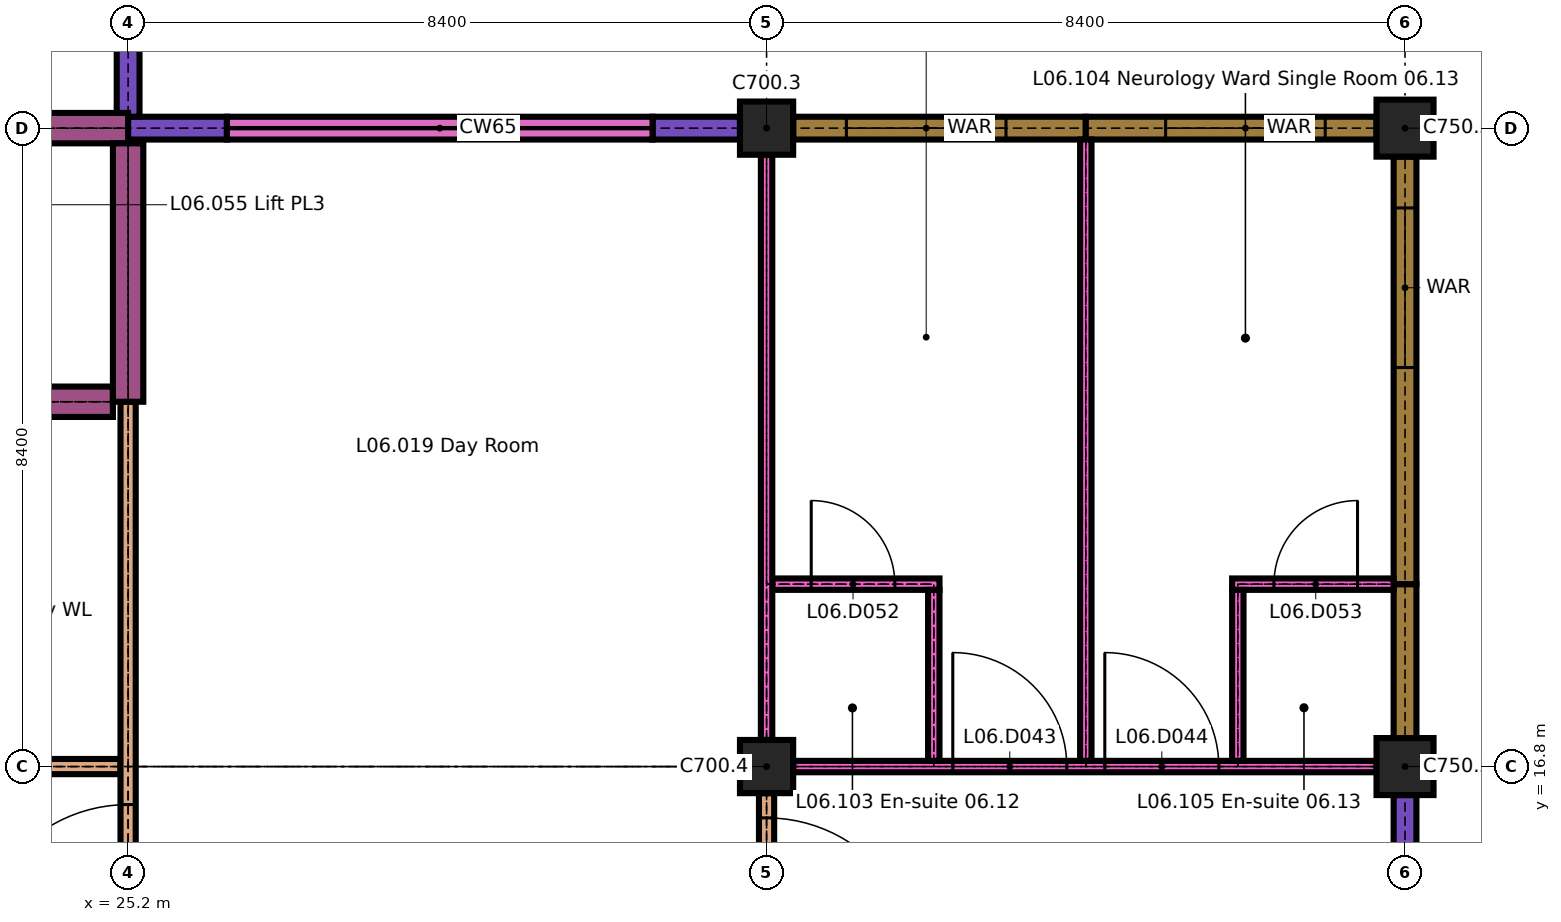
"""IFC4 building model, lengths in metres.
Left out: names, types, materials, properties, quantities, classifications, styles, units other than length and angle.
Written with IfcOpenShell. Run it as: python <this file> out.ifc"""

import sys

from ifc_helpers import new_model, si_unit, direction, frame, frame_2d, origin, origin_2d, place, context, subcontext, project, spatial, rectangle, extrude, element, fill, save


model = new_model("IFC4")
c1 = context("Model", 3, precision=1e-05, world=origin(), true_north=direction((0.0, 1.0)))
c2 = subcontext(c1, "Body", "Model", "MODEL_VIEW")
j1 = project(units=[si_unit("LENGTHUNIT", "METRE"), si_unit("PLANEANGLEUNIT", "RADIAN")], contexts=[c1])
p1 = place(None, origin())
s1 = spatial("IfcSite", under=j1, at=p1, CompositionType="ELEMENT")
p2 = place(p1, origin())
s2 = spatial("IfcBuilding", under=s1, at=p2, CompositionType="ELEMENT")
p3 = place(p2, frame((0.0, 0.0, 26.1)))
s3 = spatial("IfcBuildingStorey", under=s2, at=p3, CompositionType="ELEMENT", Elevation=26.1)
p4 = place(p3, frame((33.6, 16.8, 0.0), z_axis=(0.0, 0.0, 1.0), x_axis=(1.0, 0.0, 0.0)))
e1 = element("IfcColumn", 1, at=p4, inside=s3, PredefinedType="COLUMN", context=c2, shape_type="SweptSolid", body=[
    extrude(rectangle(XDim=0.7, YDim=0.7, at=origin_2d()), origin(), (0.0, 0.0, 1.0), 3.3),
])
p5 = place(p3, frame((42.0, 16.8, 0.0), z_axis=(0.0, 0.0, 1.0), x_axis=(1.0, 0.0, 0.0)))
e2 = element("IfcColumn", 2, at=p5, inside=s3, PredefinedType="COLUMN", context=c2, shape_type="SweptSolid", body=[
    extrude(rectangle(XDim=0.75, YDim=0.75, at=origin_2d()), origin(), (0.0, 0.0, 1.0), 3.2),
])
p6 = place(p3, frame((33.6, 25.2, 0.0), z_axis=(0.0, 0.0, 1.0), x_axis=(1.0, 0.0, 0.0)))
e3 = element("IfcColumn", 3, at=p6, inside=s3, PredefinedType="COLUMN", context=c2, shape_type="SweptSolid", body=[
    extrude(rectangle(XDim=0.7, YDim=0.7, at=origin_2d()), origin(), (0.0, 0.0, 1.0), 3.2),
])
p7 = place(p3, frame((42.0, 25.2, 0.0), z_axis=(0.0, 0.0, 1.0), x_axis=(1.0, 0.0, 0.0)))
e4 = element("IfcColumn", 4, at=p7, inside=s3, PredefinedType="COLUMN", context=c2, shape_type="SweptSolid", body=[
    extrude(rectangle(XDim=0.75, YDim=0.75, at=origin_2d()), origin(), (0.0, 0.0, 1.0), 3.2),
])
p8 = place(p3, frame((25.05, 25.2, 0.0), z_axis=(0.0, 0.0, 1.0), x_axis=(1.0, 0.0, 0.0)))
e5 = element("IfcWall", 5, at=p8, inside=s3, PredefinedType="SOLIDWALL", context=c2, shape_type="SweptSolid", body=[
    extrude(rectangle(XDim=1.45, YDim=0.3, at=frame_2d((0.725, 0.0))), origin(), (0.0, 0.0, 1.0), 3.3),
])
p9 = place(p3, frame((32.1, 25.2, 0.0), z_axis=(0.0, 0.0, 1.0), x_axis=(1.0, 0.0, 0.0)))
e6 = element("IfcWall", 6, at=p9, inside=s3, PredefinedType="SOLIDWALL", context=c2, shape_type="SweptSolid", body=[
    extrude(rectangle(XDim=1.15, YDim=0.3, at=frame_2d((0.575, 0.0))), origin(), (0.0, 0.0, 1.0), 3.3),
])
p10 = place(p3, frame((26.5, 25.2, 0.0), z_axis=(0.0, 0.0, 1.0), x_axis=(1.0, 0.0, 0.0)))
e7 = element("IfcWall", 7, at=p10, inside=s3, PredefinedType="SOLIDWALL", context=c2, shape_type="SweptSolid", body=[
    extrude(rectangle(XDim=5.6, YDim=0.3, at=frame_2d((2.8, 0.0))), origin(), (0.0, 0.0, 1.0), 0.6),
])
p11 = place(p3, frame((33.95, 25.2, 0.0), z_axis=(0.0, 0.0, 1.0), x_axis=(1.0, 0.0, 0.0)))
e8 = element("IfcWall", 8, at=p11, inside=s3, PredefinedType="SOLIDWALL", context=c2, shape_type="SweptSolid", body=[
    extrude(rectangle(XDim=3.85, YDim=0.3, at=frame_2d((1.925, 0.0))), origin(), (0.0, 0.0, 1.0), 2.9),
])
p12 = place(p11, frame((0.7, 0.0, 0.9)))
e9 = element("IfcOpeningElement", 9, at=p12, cuts=e8, PredefinedType="OPENING", context=c2, shape_type="SweptSolid", body=[
    extrude(rectangle(XDim=2.1, YDim=1.5, at=frame_2d((1.05, 0.75))), frame((0.0, 0.16, 0.0), z_axis=(0.0, -1.0, 0.0), x_axis=(1.0, 0.0, 0.0)), (0.0, 0.0, 1.0), 0.32),
])
p13 = place(p3, frame((37.8, 25.2, 0.0), z_axis=(0.0, 0.0, 1.0), x_axis=(1.0, 0.0, 0.0)))
e10 = element("IfcWall", 10, at=p13, inside=s3, PredefinedType="SOLIDWALL", context=c2, shape_type="SweptSolid", body=[
    extrude(rectangle(XDim=3.825, YDim=0.3, at=frame_2d((1.913, 0.0))), origin(), (0.0, 0.0, 1.0), 2.9),
])
p14 = place(p13, frame((1.05, 0.0, 0.9)))
e11 = element("IfcOpeningElement", 11, at=p14, cuts=e10, PredefinedType="OPENING", context=c2, shape_type="SweptSolid", body=[
    extrude(rectangle(XDim=2.1, YDim=1.5, at=frame_2d((1.05, 0.75))), frame((0.0, 0.16, 0.0), z_axis=(0.0, -1.0, 0.0), x_axis=(1.0, 0.0, 0.0)), (0.0, 0.0, 1.0), 0.32),
])
p15 = place(p3, frame((25.2, 25.35, 0.0), z_axis=(0.0, 0.0, 1.0), x_axis=(0.0, 1.0, 0.0)))
e12 = element("IfcWall", 12, at=p15, inside=s3, PredefinedType="SOLIDWALL", context=c2, shape_type="SweptSolid", body=[
    extrude(rectangle(XDim=1.15, YDim=0.3, at=frame_2d((0.575, 0.0))), origin(), (0.0, 0.0, 1.0), 3.3),
])
p16 = place(p3, frame((42.0, 13.8, 0.0), z_axis=(0.0, 0.0, 1.0), x_axis=(0.0, 1.0, 0.0)))
e13 = element("IfcWall", 13, at=p16, inside=s3, PredefinedType="SOLIDWALL", context=c2, shape_type="SweptSolid", body=[
    extrude(rectangle(XDim=2.625, YDim=0.3, at=frame_2d((1.312, 0.0))), origin(), (0.0, 0.0, 1.0), 3.3),
])
p17 = place(p16, frame((0.45, 0.0, 0.9)))
e14 = element("IfcOpeningElement", 14, at=p17, cuts=e13, PredefinedType="OPENING", context=c2, shape_type="SweptSolid", body=[
    extrude(rectangle(XDim=0.9, YDim=1.5, at=frame_2d((0.45, 0.75))), frame((0.0, 0.16, 0.0), z_axis=(0.0, -1.0, 0.0), x_axis=(1.0, 0.0, 0.0)), (0.0, 0.0, 1.0), 0.32),
])
p18 = place(p3, frame((42.0, 17.175, 0.0), z_axis=(0.0, 0.0, 1.0), x_axis=(0.0, 1.0, 0.0)))
e15 = element("IfcWall", 15, at=p18, inside=s3, PredefinedType="SOLIDWALL", context=c2, shape_type="SweptSolid", body=[
    extrude(rectangle(XDim=2.025, YDim=0.3, at=frame_2d((1.012, 0.0))), origin(), (0.0, 0.0, 1.0), 2.9),
])
p19 = place(p3, frame((42.0, 19.2, 0.0), z_axis=(0.0, 0.0, 1.0), x_axis=(0.0, 1.0, 0.0)))
e16 = element("IfcWall", 16, at=p19, inside=s3, PredefinedType="SOLIDWALL", context=c2, shape_type="SweptSolid", body=[
    extrude(rectangle(XDim=5.625, YDim=0.3, at=frame_2d((2.812, 0.0))), origin(), (0.0, 0.0, 1.0), 2.9),
])
p20 = place(p19, frame((2.85, 0.0, 0.9)))
e17 = element("IfcOpeningElement", 17, at=p20, cuts=e16, PredefinedType="OPENING", context=c2, shape_type="SweptSolid", body=[
    extrude(rectangle(XDim=2.1, YDim=1.5, at=frame_2d((1.05, 0.75))), frame((0.0, 0.16, 0.0), z_axis=(0.0, -1.0, 0.0), x_axis=(1.0, 0.0, 0.0)), (0.0, 0.0, 1.0), 0.32),
])
p21 = place(p3, frame((16.7, 16.8, 0.0), z_axis=(0.0, 0.0, 1.0), x_axis=(1.0, 0.0, 0.0)))
e18 = element("IfcWall", 18, at=p21, inside=s3, PredefinedType="PARTITIONING", context=c2, shape_type="SweptSolid", body=[
    extrude(rectangle(XDim=8.4, YDim=0.2, at=frame_2d((4.2, 0.0))), origin(), (0.0, 0.0, 1.0), 3.3),
])
p22 = place(p21, frame((3.25, 0.0, 0.0)))
e19 = element("IfcOpeningElement", 19, at=p22, cuts=e18, PredefinedType="OPENING", context=c2, shape_type="SweptSolid", body=[
    extrude(rectangle(XDim=2.0, YDim=2.4, at=frame_2d((1.0, 1.2))), frame((0.0, 0.11, 0.0), z_axis=(0.0, -1.0, 0.0), x_axis=(1.0, 0.0, 0.0)), (0.0, 0.0, 1.0), 0.22),
])
p23 = place(p3, frame((33.95, 16.8, 0.0), z_axis=(0.0, 0.0, 1.0), x_axis=(1.0, 0.0, 0.0)))
e20 = element("IfcWall", 20, at=p23, inside=s3, PredefinedType="PARTITIONING", context=c2, shape_type="SweptSolid", body=[
    extrude(rectangle(XDim=7.675, YDim=0.15, at=frame_2d((3.837, 0.0))), origin(), (0.0, 0.0, 1.0), 3.3),
])
p24 = place(p23, frame((2.1, 0.0, 0.0)))
e21 = element("IfcOpeningElement", 21, at=p24, cuts=e20, PredefinedType="OPENING", context=c2, shape_type="SweptSolid", body=[
    extrude(rectangle(XDim=1.5, YDim=2.4, at=frame_2d((0.75, 1.2))), frame((0.0, 0.085, 0.0), z_axis=(0.0, -1.0, 0.0), x_axis=(1.0, 0.0, 0.0)), (0.0, 0.0, 1.0), 0.17),
])
p25 = place(p23, frame((4.1, 0.0, 0.0)))
e22 = element("IfcOpeningElement", 22, at=p25, cuts=e20, PredefinedType="OPENING", context=c2, shape_type="SweptSolid", body=[
    extrude(rectangle(XDim=1.5, YDim=2.4, at=frame_2d((0.75, 1.2))), frame((0.0, 0.085, 0.0), z_axis=(0.0, -1.0, 0.0), x_axis=(1.0, 0.0, 0.0)), (0.0, 0.0, 1.0), 0.17),
])
p26 = place(p3, frame((33.675, 19.2, 0.0), z_axis=(0.0, 0.0, 1.0), x_axis=(1.0, 0.0, 0.0)))
e23 = element("IfcWall", 23, at=p26, inside=s3, PredefinedType="PARTITIONING", context=c2, shape_type="SweptSolid", body=[
    extrude(rectangle(XDim=2.2, YDim=0.15, at=frame_2d((1.1, 0.0))), origin(), (0.0, 0.0, 1.0), 3.3),
])
p27 = place(p26, frame((0.512, 0.0, 0.0)))
e24 = element("IfcOpeningElement", 24, at=p27, cuts=e23, PredefinedType="OPENING", context=c2, shape_type="SweptSolid", body=[
    extrude(rectangle(XDim=1.1, YDim=2.1, at=frame_2d((0.55, 1.05))), frame((0.0, 0.085, 0.0), z_axis=(0.0, -1.0, 0.0), x_axis=(1.0, 0.0, 0.0)), (0.0, 0.0, 1.0), 0.17),
])
p28 = place(p3, frame((39.725, 19.2, 0.0), z_axis=(0.0, 0.0, 1.0), x_axis=(1.0, 0.0, 0.0)))
e25 = element("IfcWall", 25, at=p28, inside=s3, PredefinedType="PARTITIONING", context=c2, shape_type="SweptSolid", body=[
    extrude(rectangle(XDim=2.125, YDim=0.15, at=frame_2d((1.062, 0.0))), origin(), (0.0, 0.0, 1.0), 3.3),
])
p29 = place(p28, frame((0.55, 0.0, 0.0)))
e26 = element("IfcOpeningElement", 26, at=p29, cuts=e25, PredefinedType="OPENING", context=c2, shape_type="SweptSolid", body=[
    extrude(rectangle(XDim=1.1, YDim=2.1, at=frame_2d((0.55, 1.05))), frame((0.0, 0.085, 0.0), z_axis=(0.0, -1.0, 0.0), x_axis=(1.0, 0.0, 0.0)), (0.0, 0.0, 1.0), 0.17),
])
p30 = place(p3, frame((17.0, 21.6, 0.0), z_axis=(0.0, 0.0, 1.0), x_axis=(1.0, 0.0, 0.0)))
e27 = element("IfcWall", 27, at=p30, inside=s3, PredefinedType="SHEAR", context=c2, shape_type="SweptSolid", body=[
    extrude(rectangle(XDim=8.0, YDim=0.4, at=frame_2d((4.0, 0.0))), origin(), (0.0, 0.0, 1.0), 3.3),
])
p31 = place(p30, frame((1.35, 0.0, 0.0)))
e28 = element("IfcOpeningElement", 28, at=p31, cuts=e27, PredefinedType="OPENING", context=c2, shape_type="SweptSolid", body=[
    extrude(rectangle(XDim=1.3, YDim=2.1, at=frame_2d((0.65, 1.05))), frame((0.0, 0.21, 0.0), z_axis=(0.0, -1.0, 0.0), x_axis=(1.0, 0.0, 0.0)), (0.0, 0.0, 1.0), 0.42),
])
p32 = place(p30, frame((5.45, 0.0, 0.0)))
e29 = element("IfcOpeningElement", 29, at=p32, cuts=e27, PredefinedType="OPENING", context=c2, shape_type="SweptSolid", body=[
    extrude(rectangle(XDim=1.1, YDim=2.1, at=frame_2d((0.55, 1.05))), frame((0.0, 0.21, 0.0), z_axis=(0.0, -1.0, 0.0), x_axis=(1.0, 0.0, 0.0)), (0.0, 0.0, 1.0), 0.42),
])
p33 = place(p3, frame((16.8, 25.2, 0.0), z_axis=(0.0, 0.0, 1.0), x_axis=(1.0, 0.0, 0.0)))
e30 = element("IfcWall", 30, at=p33, inside=s3, PredefinedType="SHEAR", context=c2, shape_type="SweptSolid", body=[
    extrude(rectangle(XDim=8.4, YDim=0.4, at=frame_2d((4.2, 0.0))), origin(), (0.0, 0.0, 1.0), 3.3),
])
p34 = place(p3, frame((25.2, 8.75, 0.0), z_axis=(0.0, 0.0, 1.0), x_axis=(0.0, 1.0, 0.0)))
e31 = element("IfcWall", 31, at=p34, inside=s3, PredefinedType="PARTITIONING", context=c2, shape_type="SweptSolid", body=[
    extrude(rectangle(XDim=12.85, YDim=0.2, at=frame_2d((6.425, 0.0))), origin(), (0.0, 0.0, 1.0), 3.3),
])
p35 = place(p34, frame((0.325, 0.0, 0.0)))
e32 = element("IfcOpeningElement", 32, at=p35, cuts=e31, PredefinedType="OPENING", context=c2, shape_type="SweptSolid", body=[
    extrude(rectangle(XDim=2.0, YDim=2.4, at=frame_2d((1.0, 1.2))), frame((0.0, 0.11, 0.0), z_axis=(0.0, -1.0, 0.0), x_axis=(1.0, 0.0, 0.0)), (0.0, 0.0, 1.0), 0.22),
])
p36 = place(p34, frame((5.55, 0.0, 0.0)))
e33 = element("IfcOpeningElement", 33, at=p36, cuts=e31, PredefinedType="OPENING", context=c2, shape_type="SweptSolid", body=[
    extrude(rectangle(XDim=2.0, YDim=2.4, at=frame_2d((1.0, 1.2))), frame((0.0, 0.11, 0.0), z_axis=(0.0, -1.0, 0.0), x_axis=(1.0, 0.0, 0.0)), (0.0, 0.0, 1.0), 0.22),
])
p37 = place(p3, frame((25.2, 21.6, 0.0), z_axis=(0.0, 0.0, 1.0), x_axis=(0.0, 1.0, 0.0)))
e34 = element("IfcWall", 34, at=p37, inside=s3, PredefinedType="SHEAR", context=c2, shape_type="SweptSolid", body=[
    extrude(rectangle(XDim=3.4, YDim=0.4, at=frame_2d((1.7, 0.0))), origin(), (0.0, 0.0, 1.0), 3.3),
])
p38 = place(p3, frame((33.6, 3.6, 0.0), z_axis=(0.0, 0.0, 1.0), x_axis=(0.0, 1.0, 0.0)))
e35 = element("IfcWall", 35, at=p38, inside=s3, PredefinedType="PARTITIONING", context=c2, shape_type="SweptSolid", body=[
    extrude(rectangle(XDim=12.85, YDim=0.2, at=frame_2d((6.425, 0.0))), origin(), (0.0, 0.0, 1.0), 3.3),
])
p39 = place(p38, frame((5.3, 0.0, 0.0)))
e36 = element("IfcOpeningElement", 36, at=p39, cuts=e35, PredefinedType="OPENING", context=c2, shape_type="SweptSolid", body=[
    extrude(rectangle(XDim=2.0, YDim=2.4, at=frame_2d((1.0, 1.2))), frame((0.0, 0.11, 0.0), z_axis=(0.0, -1.0, 0.0), x_axis=(1.0, 0.0, 0.0)), (0.0, 0.0, 1.0), 0.22),
])
p40 = place(p38, frame((10.525, 0.0, 0.0)))
e37 = element("IfcOpeningElement", 37, at=p40, cuts=e35, PredefinedType="OPENING", context=c2, shape_type="SweptSolid", body=[
    extrude(rectangle(XDim=2.0, YDim=2.4, at=frame_2d((1.0, 1.2))), frame((0.0, 0.11, 0.0), z_axis=(0.0, -1.0, 0.0), x_axis=(1.0, 0.0, 0.0)), (0.0, 0.0, 1.0), 0.22),
])
p41 = place(p3, frame((33.6, 17.15, 0.0), z_axis=(0.0, 0.0, 1.0), x_axis=(0.0, 1.0, 0.0)))
e38 = element("IfcWall", 38, at=p41, inside=s3, PredefinedType="PARTITIONING", context=c2, shape_type="SweptSolid", body=[
    extrude(rectangle(XDim=7.7, YDim=0.15, at=frame_2d((3.85, 0.0))), origin(), (0.0, 0.0, 1.0), 3.3),
])
p42 = place(p3, frame((35.8, 16.875, 0.0), z_axis=(0.0, 0.0, 1.0), x_axis=(0.0, 1.0, 0.0)))
e39 = element("IfcWall", 39, at=p42, inside=s3, PredefinedType="PARTITIONING", context=c2, shape_type="SweptSolid", body=[
    extrude(rectangle(XDim=2.25, YDim=0.15, at=frame_2d((1.125, 0.0))), origin(), (0.0, 0.0, 1.0), 3.3),
])
p43 = place(p3, frame((37.8, 16.875, 0.0), z_axis=(0.0, 0.0, 1.0), x_axis=(0.0, 1.0, 0.0)))
e40 = element("IfcWall", 40, at=p43, inside=s3, PredefinedType="PARTITIONING", context=c2, shape_type="SweptSolid", body=[
    extrude(rectangle(XDim=8.175, YDim=0.15, at=frame_2d((4.087, 0.0))), origin(), (0.0, 0.0, 1.0), 3.3),
])
p44 = place(p3, frame((39.8, 16.875, 0.0), z_axis=(0.0, 0.0, 1.0), x_axis=(0.0, 1.0, 0.0)))
e41 = element("IfcWall", 41, at=p44, inside=s3, PredefinedType="PARTITIONING", context=c2, shape_type="SweptSolid", body=[
    extrude(rectangle(XDim=2.25, YDim=0.15, at=frame_2d((1.125, 0.0))), origin(), (0.0, 0.0, 1.0), 3.3),
])
p45 = place(p12, origin())
e42 = element("IfcWindow", 42, at=p45, inside=s3, PartitioningType="DOUBLE_PANEL_VERTICAL", PredefinedType="WINDOW", context=c2, shape_type="SweptSolid", body=[
    extrude(rectangle(XDim=2.1, YDim=1.5, at=frame_2d((1.05, 0.75))), frame((0.0, 0.05, 0.0), z_axis=(0.0, -1.0, 0.0), x_axis=(1.0, 0.0, 0.0)), (0.0, 0.0, 1.0), 0.1),
])
fill(e9, e42)
p46 = place(p14, origin())
e43 = element("IfcWindow", 43, at=p46, inside=s3, PartitioningType="DOUBLE_PANEL_VERTICAL", PredefinedType="WINDOW", context=c2, shape_type="SweptSolid", body=[
    extrude(rectangle(XDim=2.1, YDim=1.5, at=frame_2d((1.05, 0.75))), frame((0.0, 0.05, 0.0), z_axis=(0.0, -1.0, 0.0), x_axis=(1.0, 0.0, 0.0)), (0.0, 0.0, 1.0), 0.1),
])
fill(e11, e43)
p47 = place(p20, origin())
e44 = element("IfcWindow", 44, at=p47, inside=s3, PartitioningType="DOUBLE_PANEL_VERTICAL", PredefinedType="WINDOW", context=c2, shape_type="SweptSolid", body=[
    extrude(rectangle(XDim=2.1, YDim=1.5, at=frame_2d((1.05, 0.75))), frame((0.0, 0.05, 0.0), z_axis=(0.0, -1.0, 0.0), x_axis=(1.0, 0.0, 0.0)), (0.0, 0.0, 1.0), 0.1),
])
fill(e17, e44)
p48 = place(p24, origin())
e45 = element("IfcDoor", 45, at=p48, inside=s3, OperationType="SINGLE_SWING_RIGHT", PredefinedType="DOOR", context=c2, shape_type="SweptSolid", body=[
    extrude(rectangle(XDim=1.5, YDim=2.4, at=frame_2d((0.75, 1.2))), frame((0.0, 0.03, 0.0), z_axis=(0.0, -1.0, 0.0), x_axis=(1.0, 0.0, 0.0)), (0.0, 0.0, 1.0), 0.06),
])
fill(e21, e45)
p49 = place(p25, origin())
e46 = element("IfcDoor", 46, at=p49, inside=s3, OperationType="SINGLE_SWING_RIGHT", PredefinedType="DOOR", context=c2, shape_type="SweptSolid", body=[
    extrude(rectangle(XDim=1.5, YDim=2.4, at=frame_2d((0.75, 1.2))), frame((0.0, 0.03, 0.0), z_axis=(0.0, -1.0, 0.0), x_axis=(1.0, 0.0, 0.0)), (0.0, 0.0, 1.0), 0.06),
])
fill(e22, e46)
p50 = place(p27, origin())
e47 = element("IfcDoor", 47, at=p50, inside=s3, OperationType="SINGLE_SWING_RIGHT", PredefinedType="DOOR", context=c2, shape_type="SweptSolid", body=[
    extrude(rectangle(XDim=1.1, YDim=2.1, at=frame_2d((0.55, 1.05))), frame((0.0, 0.025, 0.0), z_axis=(0.0, -1.0, 0.0), x_axis=(1.0, 0.0, 0.0)), (0.0, 0.0, 1.0), 0.05),
])
fill(e24, e47)
p51 = place(p29, origin())
e48 = element("IfcDoor", 48, at=p51, inside=s3, OperationType="SINGLE_SWING_LEFT", PredefinedType="DOOR", context=c2, shape_type="SweptSolid", body=[
    extrude(rectangle(XDim=1.1, YDim=2.1, at=frame_2d((0.55, 1.05))), frame((0.0, 0.025, 0.0), z_axis=(0.0, -1.0, 0.0), x_axis=(1.0, 0.0, 0.0)), (0.0, 0.0, 1.0), 0.05),
])
fill(e26, e48)
p52 = place(p36, origin())
e49 = element("IfcDoor", 49, at=p52, inside=s3, OperationType="SINGLE_SWING_RIGHT", PredefinedType="DOOR", context=c2, shape_type="SweptSolid", body=[
    extrude(rectangle(XDim=2.0, YDim=2.4, at=frame_2d((1.0, 1.2))), frame((0.0, 0.03, 0.0), z_axis=(0.0, -1.0, 0.0), x_axis=(1.0, 0.0, 0.0)), (0.0, 0.0, 1.0), 0.06),
])
fill(e33, e49)
p53 = place(p40, origin())
e50 = element("IfcDoor", 50, at=p53, inside=s3, OperationType="SINGLE_SWING_LEFT", PredefinedType="DOOR", context=c2, shape_type="SweptSolid", body=[
    extrude(rectangle(XDim=2.0, YDim=2.4, at=frame_2d((1.0, 1.2))), frame((0.0, 0.03, 0.0), z_axis=(0.0, -1.0, 0.0), x_axis=(1.0, 0.0, 0.0)), (0.0, 0.0, 1.0), 0.06),
])
fill(e37, e50)
save(model, sys.argv[1])
